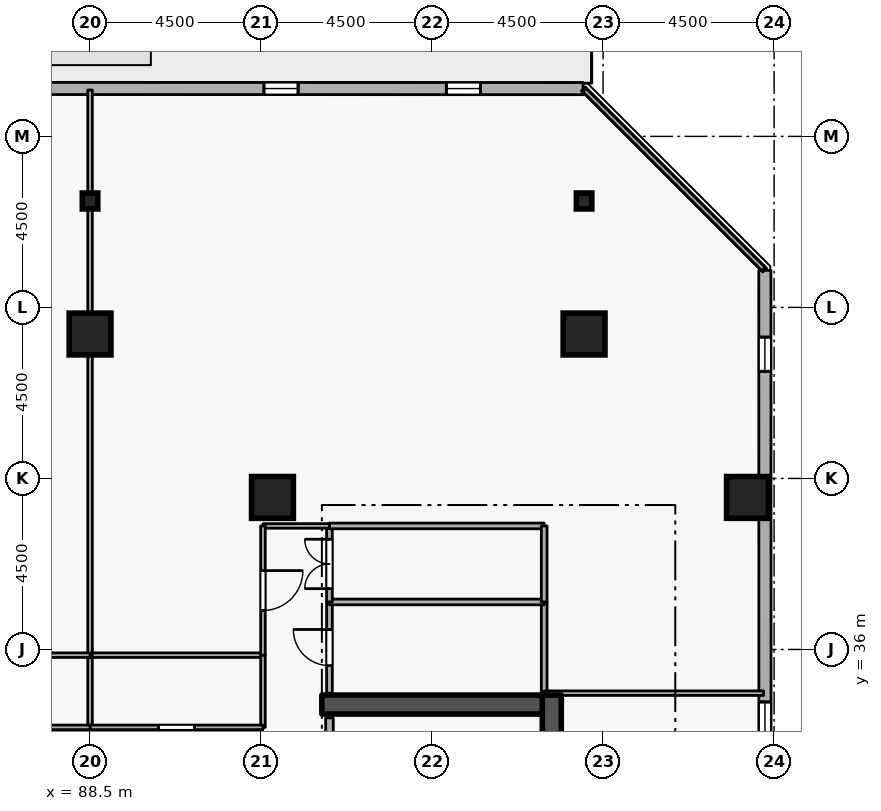
"""IFC4 building model, lengths in metres.
Left out: names, types, materials, properties, quantities, classifications, styles, units other than length and angle.
Written with IfcOpenShell. Run it as: python <this file> out.ifc"""

import sys

from ifc_helpers import new_model, si_unit, direction, frame, frame_2d, origin, origin_2d, place, context, subcontext, project, spatial, rectangle, i_section, extrude, element, fill, save


model = new_model("IFC4")
c1 = context("Model", 3, precision=1e-05, world=origin(), true_north=direction((0.0, 1.0)))
c2 = subcontext(c1, "Body", "Model", "MODEL_VIEW")
j1 = project(units=[si_unit("LENGTHUNIT", "METRE"), si_unit("PLANEANGLEUNIT", "RADIAN")], contexts=[c1])
p1 = place(None, origin())
s1 = spatial("IfcSite", under=j1, at=p1, CompositionType="ELEMENT")
p2 = place(p1, origin())
s2 = spatial("IfcBuilding", under=s1, at=p2, CompositionType="ELEMENT")
p3 = place(p2, frame((0.0, 0.0, 192.9)))
s3 = spatial("IfcBuildingStorey", under=s2, at=p3, CompositionType="ELEMENT", Elevation=192.9)
p4 = place(p3, frame((100.65, 19.2, 0.0), z_axis=(0.0, 0.0, 1.0), x_axis=(0.0, 1.0, 0.0)))
e1 = element("IfcWall", 1, at=p4, inside=s3, PredefinedType="SHEAR", context=c2, shape_type="SweptSolid", body=[
    extrude(rectangle(XDim=15.6, YDim=0.5, at=frame_2d((7.8, 0.0))), origin(), (0.0, 0.0, 1.0), 3.6),
])
p5 = place(p3, frame((94.6, 34.55, 0.0), z_axis=(0.0, 0.0, 1.0), x_axis=(1.0, 0.0, 0.0)))
e2 = element("IfcWall", 2, at=p5, inside=s3, PredefinedType="SHEAR", context=c2, shape_type="SweptSolid", body=[
    extrude(rectangle(XDim=5.8, YDim=0.5, at=frame_2d((2.9, 0.0))), origin(), (0.0, 0.0, 1.0), 3.6),
])
for number, where, z_axis, x_axis in (
    (3, (105.8, 40.0, 0.0), (0.0, 0.0, 1.0), (1.0, 0.0, 0.0)),
    (4, (101.5, 44.3, 0.0), (0.0, 0.0, 1.0), (1.0, 0.0, 0.0)),
    (5, (88.5, 44.3, 0.0), (0.0, 0.0, 1.0), (1.0, 0.0, 0.0)),
    (6, (93.3, 40.0, 0.0), (0.0, 0.0, 1.0), (1.0, 0.0, 0.0)),
):
    element("IfcColumn", number, at=place(p3, frame(where, z_axis=z_axis, x_axis=x_axis)), inside=s3, PredefinedType="COLUMN", context=c2, shape_type="SweptSolid", body=[
        extrude(rectangle(XDim=1.1, YDim=1.1, at=origin_2d()), origin(), (0.0, 0.0, 1.0), 3.6),
    ])
for number, where, z_axis, x_axis in (
    (7, (101.5, 47.8, 0.0), (0.0, 0.0, 1.0), (1.0, 0.0, 0.0)),
    (8, (88.5, 47.8, 0.0), (0.0, 0.0, 1.0), (1.0, 0.0, 0.0)),
):
    element("IfcColumn", number, at=place(p3, frame(where, z_axis=z_axis, x_axis=x_axis)), inside=s3, PredefinedType="COLUMN", context=c2, shape_type="SweptSolid", body=[
        extrude(i_section(OverallWidth=0.407, OverallDepth=0.419, WebThickness=0.031, FlangeThickness=0.049, FilletRadius=0.015, at=origin_2d()), origin(), (0.0, 0.0, 1.0), 3.6),
    ])
p6 = place(p3, frame((106.265, 11.819, 0.0), z_axis=(0.0, 0.0, 1.0), x_axis=(-0.000214431216, 0.99999997701, 0.0)))
e9 = element("IfcWall", 9, at=p6, inside=s3, PredefinedType="STANDARD", context=c2, shape_type="SweptSolid", body=[
    extrude(rectangle(XDim=34.156, YDim=0.32, at=frame_2d((17.078, 0.0))), origin(), (0.0, 0.0, 1.0), 2.7),
])
p7 = place(p6, frame((7.5, 0.0, 0.72)))
e10 = element("IfcOpeningElement", 10, at=p7, cuts=e9, PredefinedType="OPENING", context=c2, shape_type="SweptSolid", body=[
    extrude(rectangle(XDim=0.9, YDim=1.75, at=frame_2d((0.45, 0.875))), frame((0.0, 0.17, 0.0), z_axis=(0.0, -1.0, 0.0), x_axis=(1.0, 0.0, 0.0)), (0.0, 0.0, 1.0), 0.34),
])
p8 = place(p6, frame((12.3, 0.0, 0.72)))
e11 = element("IfcOpeningElement", 11, at=p8, cuts=e9, PredefinedType="OPENING", context=c2, shape_type="SweptSolid", body=[
    extrude(rectangle(XDim=0.9, YDim=1.75, at=frame_2d((0.45, 0.875))), frame((0.0, 0.17, 0.0), z_axis=(0.0, -1.0, 0.0), x_axis=(1.0, 0.0, 0.0)), (0.0, 0.0, 1.0), 0.34),
])
p9 = place(p6, frame((17.1, 0.0, 0.72)))
e12 = element("IfcOpeningElement", 12, at=p9, cuts=e9, PredefinedType="OPENING", context=c2, shape_type="SweptSolid", body=[
    extrude(rectangle(XDim=0.9, YDim=1.75, at=frame_2d((0.45, 0.875))), frame((0.0, 0.17, 0.0), z_axis=(0.0, -1.0, 0.0), x_axis=(1.0, 0.0, 0.0)), (0.0, 0.0, 1.0), 0.34),
])
p10 = place(p6, frame((21.9, 0.0, 0.72)))
e13 = element("IfcOpeningElement", 13, at=p10, cuts=e9, PredefinedType="OPENING", context=c2, shape_type="SweptSolid", body=[
    extrude(rectangle(XDim=0.9, YDim=1.75, at=frame_2d((0.45, 0.875))), frame((0.0, 0.17, 0.0), z_axis=(0.0, -1.0, 0.0), x_axis=(1.0, 0.0, 0.0)), (0.0, 0.0, 1.0), 0.34),
])
p11 = place(p6, frame((31.5, 0.0, 0.72)))
e14 = element("IfcOpeningElement", 14, at=p11, cuts=e9, PredefinedType="OPENING", context=c2, shape_type="SweptSolid", body=[
    extrude(rectangle(XDim=0.9, YDim=1.75, at=frame_2d((0.45, 0.875))), frame((0.0, 0.17, 0.0), z_axis=(0.0, -1.0, 0.0), x_axis=(1.0, 0.0, 0.0)), (0.0, 0.0, 1.0), 0.34),
])
p12 = place(p3, frame((101.475, 50.757, 0.0), z_axis=(0.0, 0.0, 1.0), x_axis=(-0.99999997701, 0.000214431216, 0.0)))
e15 = element("IfcWall", 15, at=p12, inside=s3, PredefinedType="STANDARD", context=c2, shape_type="SweptSolid", body=[
    extrude(rectangle(XDim=34.156, YDim=0.32, at=frame_2d((17.078, 0.0))), origin(), (0.0, 0.0, 1.0), 2.7),
])
p13 = place(p12, frame((18.878, 0.0, 0.0)))
e16 = element("IfcOpeningElement", 16, at=p13, cuts=e15, PredefinedType="OPENING", context=c2, shape_type="SweptSolid", body=[
    extrude(rectangle(XDim=1.0, YDim=2.08, at=frame_2d((0.5, 1.04))), frame((0.0, 0.17, 0.0), z_axis=(0.0, -1.0, 0.0), x_axis=(1.0, 0.0, 0.0)), (0.0, 0.0, 1.0), 0.34),
])
p14 = place(p12, frame((2.7, 0.0, 0.72)))
e17 = element("IfcOpeningElement", 17, at=p14, cuts=e15, PredefinedType="OPENING", context=c2, shape_type="SweptSolid", body=[
    extrude(rectangle(XDim=0.9, YDim=1.75, at=frame_2d((0.45, 0.875))), frame((0.0, 0.17, 0.0), z_axis=(0.0, -1.0, 0.0), x_axis=(1.0, 0.0, 0.0)), (0.0, 0.0, 1.0), 0.34),
])
p15 = place(p12, frame((7.5, 0.0, 0.72)))
e18 = element("IfcOpeningElement", 18, at=p15, cuts=e15, PredefinedType="OPENING", context=c2, shape_type="SweptSolid", body=[
    extrude(rectangle(XDim=0.9, YDim=1.75, at=frame_2d((0.45, 0.875))), frame((0.0, 0.17, 0.0), z_axis=(0.0, -1.0, 0.0), x_axis=(1.0, 0.0, 0.0)), (0.0, 0.0, 1.0), 0.34),
])
p16 = place(p12, frame((17.1, 0.0, 0.72)))
e19 = element("IfcOpeningElement", 19, at=p16, cuts=e15, PredefinedType="OPENING", context=c2, shape_type="SweptSolid", body=[
    extrude(rectangle(XDim=0.9, YDim=1.75, at=frame_2d((0.45, 0.875))), frame((0.0, 0.17, 0.0), z_axis=(0.0, -1.0, 0.0), x_axis=(1.0, 0.0, 0.0)), (0.0, 0.0, 1.0), 0.34),
])
p17 = place(p12, frame((21.9, 0.0, 0.72)))
e20 = element("IfcOpeningElement", 20, at=p17, cuts=e15, PredefinedType="OPENING", context=c2, shape_type="SweptSolid", body=[
    extrude(rectangle(XDim=0.9, YDim=1.75, at=frame_2d((0.45, 0.875))), frame((0.0, 0.17, 0.0), z_axis=(0.0, -1.0, 0.0), x_axis=(1.0, 0.0, 0.0)), (0.0, 0.0, 1.0), 0.34),
])
p18 = place(p12, frame((26.7, 0.0, 0.72)))
e21 = element("IfcOpeningElement", 21, at=p18, cuts=e15, PredefinedType="OPENING", context=c2, shape_type="SweptSolid", body=[
    extrude(rectangle(XDim=0.9, YDim=1.75, at=frame_2d((0.45, 0.875))), frame((0.0, 0.17, 0.0), z_axis=(0.0, -1.0, 0.0), x_axis=(1.0, 0.0, 0.0)), (0.0, 0.0, 1.0), 0.34),
])
p19 = place(p12, frame((31.5, 0.0, 0.72)))
e22 = element("IfcOpeningElement", 22, at=p19, cuts=e15, PredefinedType="OPENING", context=c2, shape_type="SweptSolid", body=[
    extrude(rectangle(XDim=0.9, YDim=1.75, at=frame_2d((0.45, 0.875))), frame((0.0, 0.17, 0.0), z_axis=(0.0, -1.0, 0.0), x_axis=(1.0, 0.0, 0.0)), (0.0, 0.0, 1.0), 0.34),
])
p20 = place(p3, frame((94.8, 31.95, 0.0), z_axis=(0.0, 0.0, 1.0), x_axis=(0.0, 1.0, 0.0)))
e23 = element("IfcWall", 23, at=p20, inside=s3, PredefinedType="STANDARD", context=c2, shape_type="SweptSolid", body=[
    extrude(rectangle(XDim=2.25, YDim=0.2, at=frame_2d((1.125, 0.0))), origin(), (0.0, 0.0, 1.0), 3.34),
])
p21 = place(p20, frame((0.55, 0.0, 0.0)))
e24 = element("IfcOpeningElement", 24, at=p21, cuts=e23, PredefinedType="OPENING", context=c2, shape_type="SweptSolid", body=[
    extrude(rectangle(XDim=1.15, YDim=2.1, at=frame_2d((0.575, 1.05))), frame((0.0, 0.11, 0.0), z_axis=(0.0, -1.0, 0.0), x_axis=(1.0, 0.0, 0.0)), (0.0, 0.0, 1.0), 0.22),
])
p22 = place(p3, frame((100.45, 37.25, 0.0), z_axis=(0.0, 0.0, 1.0), x_axis=(0.0, -1.0, 0.0)))
e25 = element("IfcWall", 25, at=p22, inside=s3, PredefinedType="PARTITIONING", context=c2, shape_type="SweptSolid", body=[
    extrude(rectangle(XDim=2.4, YDim=0.15, at=frame_2d((1.2, 0.0))), origin(), (0.0, 0.0, 1.0), 3.34),
])
p23 = place(p3, frame((94.8, 34.85, 0.0), z_axis=(0.0, 0.0, 1.0), x_axis=(0.0, 1.0, 0.0)))
e26 = element("IfcWall", 26, at=p23, inside=s3, PredefinedType="PARTITIONING", context=c2, shape_type="SweptSolid", body=[
    extrude(rectangle(XDim=2.4, YDim=0.15, at=frame_2d((1.2, 0.0))), origin(), (0.0, 0.0, 1.0), 3.34),
])
p24 = place(p23, frame((0.725, 0.0, 0.0)))
e27 = element("IfcOpeningElement", 27, at=p24, cuts=e26, PredefinedType="OPENING", context=c2, shape_type="SweptSolid", body=[
    extrude(rectangle(XDim=0.95, YDim=2.1, at=frame_2d((0.475, 1.05))), frame((0.0, 0.085, 0.0), z_axis=(0.0, -1.0, 0.0), x_axis=(1.0, 0.0, 0.0)), (0.0, 0.0, 1.0), 0.17),
])
p25 = place(p3, frame((94.8, 37.25, 0.0), z_axis=(0.0, 0.0, 1.0), x_axis=(1.0, 0.0, 0.0)))
e28 = element("IfcWall", 28, at=p25, inside=s3, PredefinedType="PARTITIONING", context=c2, shape_type="SweptSolid", body=[
    extrude(rectangle(XDim=5.65, YDim=0.15, at=frame_2d((2.825, 0.0))), origin(), (0.0, 0.0, 1.0), 3.34),
])
p26 = place(p3, frame((94.8, 37.25, 0.0), z_axis=(0.0, 0.0, 1.0), x_axis=(0.0, 1.0, 0.0)))
e29 = element("IfcWall", 29, at=p26, inside=s3, PredefinedType="PARTITIONING", context=c2, shape_type="SweptSolid", body=[
    extrude(rectangle(XDim=2.0, YDim=0.15, at=frame_2d((1.0, 0.0))), origin(), (0.0, 0.0, 1.0), 3.34),
])
p27 = place(p26, frame((0.35, 0.0, 0.0)))
e30 = element("IfcOpeningElement", 30, at=p27, cuts=e29, PredefinedType="OPENING", context=c2, shape_type="SweptSolid", body=[
    extrude(rectangle(XDim=1.3, YDim=2.12, at=frame_2d((0.65, 1.06))), frame((0.0, 0.085, 0.0), z_axis=(0.0, -1.0, 0.0), x_axis=(1.0, 0.0, 0.0)), (0.0, 0.0, 1.0), 0.17),
])
p28 = place(p3, frame((94.8, 39.25, 0.0), z_axis=(0.0, 0.0, 1.0), x_axis=(1.0, 0.0, 0.0)))
e31 = element("IfcWall", 31, at=p28, inside=s3, PredefinedType="PARTITIONING", context=c2, shape_type="SweptSolid", body=[
    extrude(rectangle(XDim=5.65, YDim=0.15, at=frame_2d((2.825, 0.0))), origin(), (0.0, 0.0, 1.0), 3.34),
])
p29 = place(p3, frame((100.45, 39.25, 0.0), z_axis=(0.0, 0.0, 1.0), x_axis=(0.0, -1.0, 0.0)))
e32 = element("IfcWall", 32, at=p29, inside=s3, PredefinedType="PARTITIONING", context=c2, shape_type="SweptSolid", body=[
    extrude(rectangle(XDim=2.0, YDim=0.15, at=frame_2d((1.0, 0.0))), origin(), (0.0, 0.0, 1.0), 3.34),
])
p30 = place(p3, frame((88.5, 33.95, 0.0), z_axis=(0.0, 0.0, 1.0), x_axis=(0.0, 1.0, 0.0)))
e33 = element("IfcWall", 33, at=p30, inside=s3, PredefinedType="PARTITIONING", context=c2, shape_type="SweptSolid", body=[
    extrude(rectangle(XDim=1.9, YDim=0.12, at=frame_2d((0.95, 0.0))), origin(), (0.0, 0.0, 1.0), 3.34),
])
p31 = place(p3, frame((88.5, 35.85, 0.0), z_axis=(0.0, 0.0, 1.0), x_axis=(1.0, 0.0, 0.0)))
e34 = element("IfcWall", 34, at=p31, inside=s3, PredefinedType="PARTITIONING", context=c2, shape_type="SweptSolid", body=[
    extrude(rectangle(XDim=4.55, YDim=0.12, at=frame_2d((2.275, 0.0))), origin(), (0.0, 0.0, 1.0), 3.34),
])
p32 = place(p3, frame((93.05, 35.85, 0.0), z_axis=(0.0, 0.0, 1.0), x_axis=(0.0, -1.0, 0.0)))
e35 = element("IfcWall", 35, at=p32, inside=s3, PredefinedType="PARTITIONING", context=c2, shape_type="SweptSolid", body=[
    extrude(rectangle(XDim=1.9, YDim=0.12, at=frame_2d((0.95, 0.0))), origin(), (0.0, 0.0, 1.0), 3.34),
])
p33 = place(p3, frame((93.05, 33.95, 0.0), z_axis=(0.0, 0.0, 1.0), x_axis=(-1.0, 0.0, 0.0)))
e36 = element("IfcWall", 36, at=p33, inside=s3, PredefinedType="PARTITIONING", context=c2, shape_type="SweptSolid", body=[
    extrude(rectangle(XDim=4.55, YDim=0.12, at=frame_2d((2.275, 0.0))), origin(), (0.0, 0.0, 1.0), 3.34),
])
p34 = place(p33, frame((1.8, 0.0, 0.0)))
e37 = element("IfcOpeningElement", 37, at=p34, cuts=e36, PredefinedType="OPENING", context=c2, shape_type="SweptSolid", body=[
    extrude(rectangle(XDim=0.95, YDim=2.1, at=frame_2d((0.475, 1.05))), frame((0.0, 0.07, 0.0), z_axis=(0.0, -1.0, 0.0), x_axis=(1.0, 0.0, 0.0)), (0.0, 0.0, 1.0), 0.14),
])
p35 = place(p3, frame((94.8, 39.25, 0.0), z_axis=(0.0, 0.0, 1.0), x_axis=(-1.0, 0.0, 0.0)))
e38 = element("IfcWall", 38, at=p35, inside=s3, PredefinedType="PARTITIONING", context=c2, shape_type="SweptSolid", body=[
    extrude(rectangle(XDim=1.75, YDim=0.12, at=frame_2d((0.875, 0.0))), origin(), (0.0, 0.0, 1.0), 3.34),
])
p36 = place(p3, frame((93.05, 39.25, 0.0), z_axis=(0.0, 0.0, 1.0), x_axis=(0.0, -1.0, 0.0)))
e39 = element("IfcWall", 39, at=p36, inside=s3, PredefinedType="PARTITIONING", context=c2, shape_type="SweptSolid", body=[
    extrude(rectangle(XDim=3.4, YDim=0.12, at=frame_2d((1.7, 0.0))), origin(), (0.0, 0.0, 1.0), 3.34),
])
p37 = place(p36, frame((1.175, 0.0, 0.0)))
e40 = element("IfcOpeningElement", 40, at=p37, cuts=e39, PredefinedType="OPENING", context=c2, shape_type="SweptSolid", body=[
    extrude(rectangle(XDim=1.05, YDim=2.1, at=frame_2d((0.525, 1.05))), frame((0.0, 0.07, 0.0), z_axis=(0.0, -1.0, 0.0), x_axis=(1.0, 0.0, 0.0)), (0.0, 0.0, 1.0), 0.14),
])
p38 = place(p3, frame((88.5, 35.85, 0.0), z_axis=(0.0, 0.0, 1.0), x_axis=(0.0, 1.0, 0.0)))
e41 = element("IfcWall", 41, at=p38, inside=s3, PredefinedType="PARTITIONING", context=c2, shape_type="SweptSolid", body=[
    extrude(rectangle(XDim=14.87, YDim=0.12, at=frame_2d((7.435, 0.0))), origin(), (0.0, 0.0, 1.0), 2.882),
])
p39 = place(p3, frame((101.51, 50.72, 0.0), z_axis=(0.0, 0.0, 1.0), x_axis=(0.707106781187, -0.707106781187, 0.0)))
e42 = element("IfcWall", 42, at=p39, inside=s3, PredefinedType="PARTITIONING", context=c2, shape_type="SweptSolid", body=[
    extrude(rectangle(XDim=6.66, YDim=0.12, at=frame_2d((3.33, 0.0))), origin(), (0.0, 0.0, 1.0), 3.34),
])
p40 = place(p3, frame((106.22, 34.85, 0.0), z_axis=(0.0, 0.0, 1.0), x_axis=(-1.0, 0.0, 0.0)))
e43 = element("IfcWall", 43, at=p40, inside=s3, PredefinedType="PARTITIONING", context=c2, shape_type="SweptSolid", body=[
    extrude(rectangle(XDim=5.77, YDim=0.12, at=frame_2d((2.885, 0.0))), origin(), (0.0, 0.0, 1.0), 2.545),
])
p41 = place(p3, frame((83.95, 35.85, 0.0), z_axis=(0.0, 0.0, 1.0), x_axis=(1.0, 0.0, 0.0)))
e44 = element("IfcWall", 44, at=p41, inside=s3, PredefinedType="PARTITIONING", context=c2, shape_type="SweptSolid", body=[
    extrude(rectangle(XDim=4.55, YDim=0.12, at=frame_2d((2.275, 0.0))), origin(), (0.0, 0.0, 1.0), 3.34),
])
p42 = place(p3, frame((88.5, 33.95, 0.0), z_axis=(0.0, 0.0, 1.0), x_axis=(-1.0, 0.0, 0.0)))
e45 = element("IfcWall", 45, at=p42, inside=s3, PredefinedType="PARTITIONING", context=c2, shape_type="SweptSolid", body=[
    extrude(rectangle(XDim=4.55, YDim=0.12, at=frame_2d((2.275, 0.0))), origin(), (0.0, 0.0, 1.0), 3.34),
])
p43 = place(p42, frame((1.8, 0.0, 0.0)))
e46 = element("IfcOpeningElement", 46, at=p43, cuts=e45, PredefinedType="OPENING", context=c2, shape_type="SweptSolid", body=[
    extrude(rectangle(XDim=0.95, YDim=2.1, at=frame_2d((0.475, 1.05))), frame((0.0, 0.07, 0.0), z_axis=(0.0, -1.0, 0.0), x_axis=(1.0, 0.0, 0.0)), (0.0, 0.0, 1.0), 0.14),
])
p44 = place(p10, origin())
e47 = element("IfcWindow", 47, at=p44, inside=s3, PartitioningType="SINGLE_PANEL", PredefinedType="WINDOW", context=c2, shape_type="SweptSolid", body=[
    extrude(rectangle(XDim=0.9, YDim=1.75, at=frame_2d((0.45, 0.875))), frame((0.0, 0.03, 0.0), z_axis=(0.0, -1.0, 0.0), x_axis=(1.0, 0.0, 0.0)), (0.0, 0.0, 1.0), 0.06),
])
fill(e13, e47)
p45 = place(p11, origin())
e48 = element("IfcWindow", 48, at=p45, inside=s3, PartitioningType="SINGLE_PANEL", PredefinedType="WINDOW", context=c2, shape_type="SweptSolid", body=[
    extrude(rectangle(XDim=0.9, YDim=1.75, at=frame_2d((0.45, 0.875))), frame((0.0, 0.03, 0.0), z_axis=(0.0, -1.0, 0.0), x_axis=(1.0, 0.0, 0.0)), (0.0, 0.0, 1.0), 0.06),
])
fill(e14, e48)
p46 = place(p14, origin())
e49 = element("IfcWindow", 49, at=p46, inside=s3, PartitioningType="SINGLE_PANEL", PredefinedType="WINDOW", context=c2, shape_type="SweptSolid", body=[
    extrude(rectangle(XDim=0.9, YDim=1.75, at=frame_2d((0.45, 0.875))), frame((0.0, 0.03, 0.0), z_axis=(0.0, -1.0, 0.0), x_axis=(1.0, 0.0, 0.0)), (0.0, 0.0, 1.0), 0.06),
])
fill(e17, e49)
p47 = place(p15, origin())
e50 = element("IfcWindow", 50, at=p47, inside=s3, PartitioningType="SINGLE_PANEL", PredefinedType="WINDOW", context=c2, shape_type="SweptSolid", body=[
    extrude(rectangle(XDim=0.9, YDim=1.75, at=frame_2d((0.45, 0.875))), frame((0.0, 0.03, 0.0), z_axis=(0.0, -1.0, 0.0), x_axis=(1.0, 0.0, 0.0)), (0.0, 0.0, 1.0), 0.06),
])
fill(e18, e50)
p48 = place(p24, origin())
e51 = element("IfcDoor", 51, at=p48, inside=s3, OperationType="SINGLE_SWING_RIGHT", PredefinedType="DOOR", context=c2, shape_type="SweptSolid", body=[
    extrude(rectangle(XDim=0.95, YDim=2.1, at=frame_2d((0.475, 1.05))), frame((0.0, 0.025, 0.0), z_axis=(0.0, -1.0, 0.0), x_axis=(1.0, 0.0, 0.0)), (0.0, 0.0, 1.0), 0.05),
])
fill(e27, e51)
p49 = place(p27, origin())
e52 = element("IfcDoor", 52, at=p49, inside=s3, OperationType="DOUBLE_DOOR_SINGLE_SWING", PredefinedType="DOOR", context=c2, shape_type="SweptSolid", body=[
    extrude(rectangle(XDim=1.3, YDim=2.12, at=frame_2d((0.65, 1.06))), frame((0.0, 0.025, 0.0), z_axis=(0.0, -1.0, 0.0), x_axis=(1.0, 0.0, 0.0)), (0.0, 0.0, 1.0), 0.05),
])
fill(e30, e52)
p50 = place(p34, origin())
e53 = element("IfcDoor", 53, at=p50, inside=s3, OperationType="SINGLE_SWING_RIGHT", PredefinedType="DOOR", context=c2, shape_type="SweptSolid", body=[
    extrude(rectangle(XDim=0.95, YDim=2.1, at=frame_2d((0.475, 1.05))), frame((0.0, 0.025, 0.0), z_axis=(0.0, -1.0, 0.0), x_axis=(1.0, 0.0, 0.0)), (0.0, 0.0, 1.0), 0.05),
])
fill(e37, e53)
p51 = place(p37, origin())
e54 = element("IfcDoor", 54, at=p51, inside=s3, OperationType="SINGLE_SWING_LEFT", PredefinedType="DOOR", context=c2, shape_type="SweptSolid", body=[
    extrude(rectangle(XDim=1.05, YDim=2.1, at=frame_2d((0.525, 1.05))), frame((0.0, 0.025, 0.0), z_axis=(0.0, -1.0, 0.0), x_axis=(1.0, 0.0, 0.0)), (0.0, 0.0, 1.0), 0.05),
])
fill(e40, e54)
save(model, sys.argv[1])
